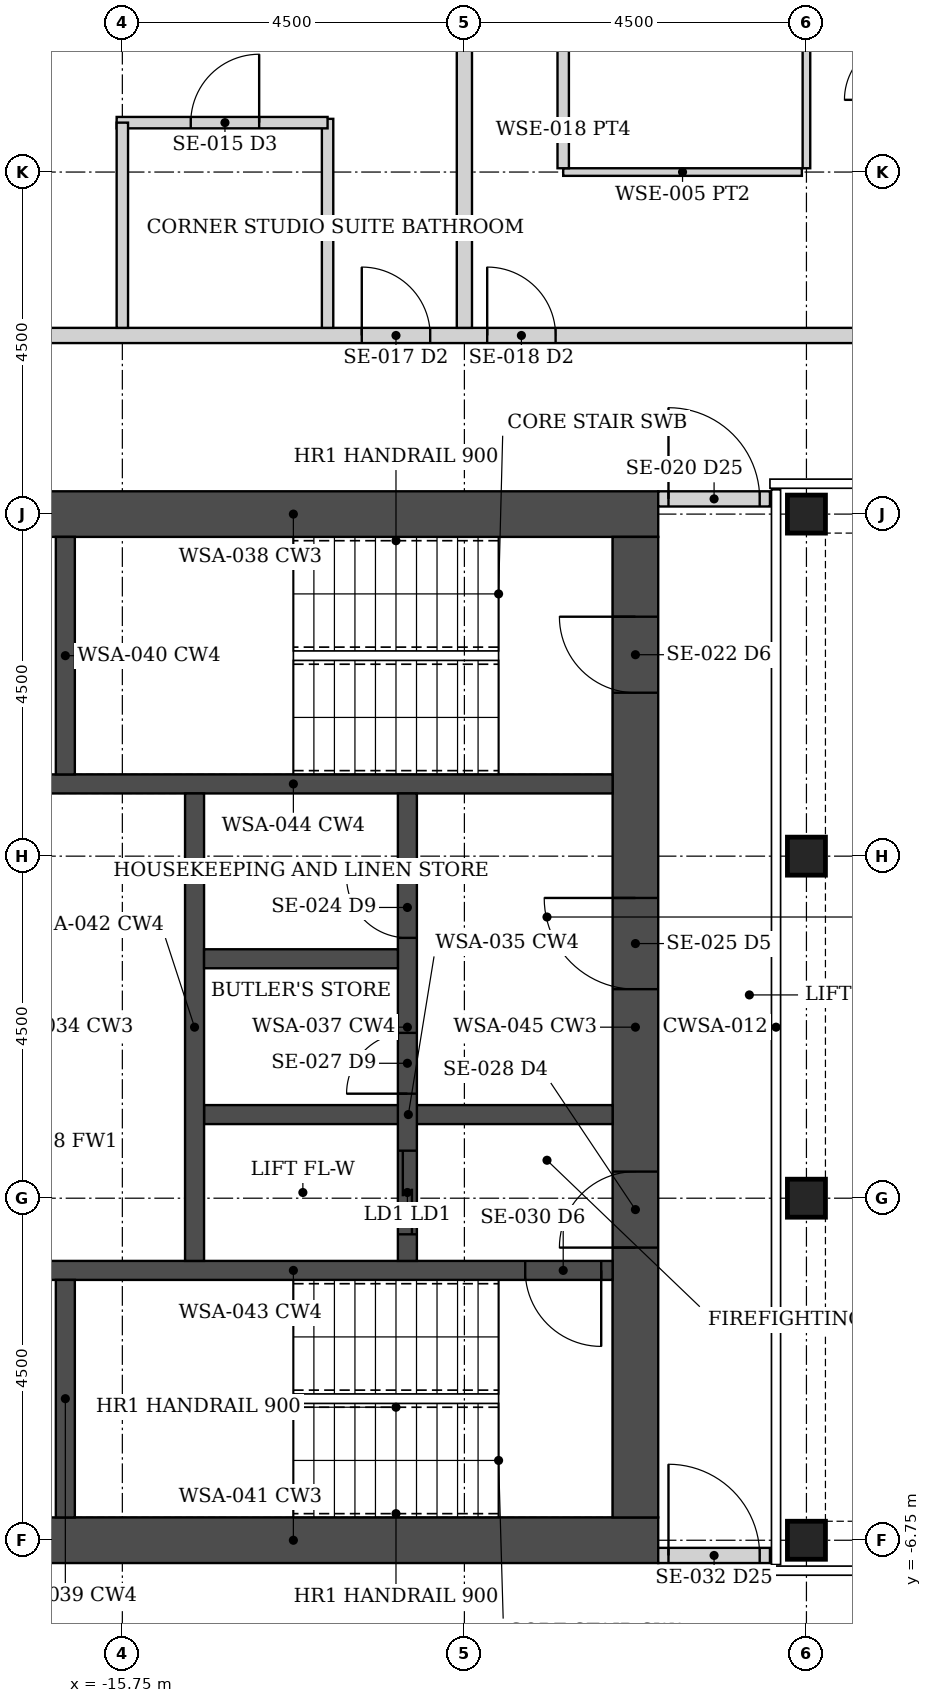
"""IFC4 building model, lengths in metres.
Left out: names, types, materials, properties, quantities, classifications, styles, units other than length and angle.
Written with IfcOpenShell. Run it as: python <this file> out.ifc"""

import sys

from ifc_helpers import new_model, si_unit, direction, frame, frame_2d, origin, origin_2d, place, context, subcontext, project, spatial, rectangle, hollow_rectangle, extrude, element, fill, save


model = new_model("IFC4")
c1 = context("Model", 3, precision=1e-05, world=origin(), true_north=direction((0.0, 1.0)))
c2 = subcontext(c1, "Body", "Model", "MODEL_VIEW")
j1 = project(units=[si_unit("LENGTHUNIT", "METRE"), si_unit("PLANEANGLEUNIT", "RADIAN")], contexts=[c1])
p1 = place(None, origin())
s1 = spatial("IfcSite", under=j1, at=p1, CompositionType="ELEMENT")
p2 = place(p1, origin())
s2 = spatial("IfcBuilding", under=s1, at=p2, CompositionType="ELEMENT")
p3 = place(p2, frame((0.0, 0.0, 245.8)))
s3 = spatial("IfcBuildingStorey", under=s2, at=p3, CompositionType="ELEMENT", Elevation=245.8)
for number, where, z_axis, x_axis in (
    (1, (-6.75, -6.75, 0.0), (0.0, 0.0, 1.0), (1.0, 0.0, 0.0)),
    (2, (-6.75, -2.25, 0.0), (0.0, 0.0, 1.0), (1.0, 0.0, 0.0)),
    (3, (-6.75, 2.25, 0.0), (0.0, 0.0, 1.0), (1.0, 0.0, 0.0)),
    (4, (-6.75, 6.75, 0.0), (0.0, 0.0, 1.0), (1.0, 0.0, 0.0)),
):
    element("IfcColumn", number, at=place(p3, frame(where, z_axis=z_axis, x_axis=x_axis)), inside=s3, PredefinedType="COLUMN", context=c2, shape_type="SweptSolid", body=[
        extrude(hollow_rectangle(XDim=0.5, YDim=0.5, WallThickness=0.025, at=origin_2d()), origin(), (0.0, 0.0, 1.0), 3.75),
    ])
for number, where, z_axis, x_axis in (
    (5, (-8.7, -6.75, 0.0), (0.0, 0.0, 1.0), (-1.0, 0.0, 0.0)),
    (6, (-8.7, 6.75, 0.0), (0.0, 0.0, 1.0), (-1.0, 0.0, 0.0)),
):
    element("IfcWall", number, at=place(p3, frame(where, z_axis=z_axis, x_axis=x_axis)), inside=s3, PredefinedType="SHEAR", context=c2, shape_type="SweptSolid", body=[
        extrude(rectangle(XDim=9.6, YDim=0.6, at=frame_2d((4.8, 0.0))), origin(), (0.0, 0.0, 1.0), 3.75),
    ])
p4 = place(p3, frame((-9.0, -6.45, 0.0), z_axis=(0.0, 0.0, 1.0), x_axis=(0.0, 1.0, 0.0)))
e7 = element("IfcWall", 7, at=p4, inside=s3, PredefinedType="SHEAR", context=c2, shape_type="SweptSolid", body=[
    extrude(rectangle(XDim=12.9, YDim=0.6, at=frame_2d((6.45, 0.0))), origin(), (0.0, 0.0, 1.0), 3.75),
])
p5 = place(p4, frame((3.55, 0.0, 0.0)))
e8 = element("IfcOpeningElement", 8, at=p5, cuts=e7, PredefinedType="OPENING", context=c2, shape_type="SweptSolid", body=[
    extrude(rectangle(XDim=1.0, YDim=2.1, at=frame_2d((0.5, 1.05))), frame((0.0, 0.31, 0.0), z_axis=(0.0, -1.0, 0.0), x_axis=(1.0, 0.0, 0.0)), (0.0, 0.0, 1.0), 0.62),
])
p6 = place(p4, frame((6.95, 0.0, 0.0)))
e9 = element("IfcOpeningElement", 9, at=p6, cuts=e7, PredefinedType="OPENING", context=c2, shape_type="SweptSolid", body=[
    extrude(rectangle(XDim=1.2, YDim=2.1, at=frame_2d((0.6, 1.05))), frame((0.0, 0.31, 0.0), z_axis=(0.0, -1.0, 0.0), x_axis=(1.0, 0.0, 0.0)), (0.0, 0.0, 1.0), 0.62),
])
p7 = place(p4, frame((10.85, 0.0, 0.0)))
e10 = element("IfcOpeningElement", 10, at=p7, cuts=e7, PredefinedType="OPENING", context=c2, shape_type="SweptSolid", body=[
    extrude(rectangle(XDim=1.0, YDim=2.1, at=frame_2d((0.5, 1.05))), frame((0.0, 0.31, 0.0), z_axis=(0.0, -1.0, 0.0), x_axis=(1.0, 0.0, 0.0)), (0.0, 0.0, 1.0), 0.62),
])
p8 = place(p3, frame((-9.3, -3.2, 0.0), z_axis=(0.0, 0.0, 1.0), x_axis=(-1.0, 0.0, 0.0)))
e11 = element("IfcWall", 11, at=p8, inside=s3, PredefinedType="SHEAR", context=c2, shape_type="SweptSolid", body=[
    extrude(rectangle(XDim=8.4, YDim=0.25, at=frame_2d((4.2, 0.0))), origin(), (0.0, 0.0, 1.0), 3.75),
])
p9 = place(p8, frame((0.15, 0.0, 0.0)))
e12 = element("IfcOpeningElement", 12, at=p9, cuts=e11, PredefinedType="OPENING", context=c2, shape_type="SweptSolid", body=[
    extrude(rectangle(XDim=1.0, YDim=2.1, at=frame_2d((0.5, 1.05))), frame((0.0, 0.135, 0.0), z_axis=(0.0, -1.0, 0.0), x_axis=(1.0, 0.0, 0.0)), (0.0, 0.0, 1.0), 0.27),
])
p10 = place(p3, frame((-9.3, 3.2, 0.0), z_axis=(0.0, 0.0, 1.0), x_axis=(-1.0, 0.0, 0.0)))
e13 = element("IfcWall", 13, at=p10, inside=s3, PredefinedType="SHEAR", context=c2, shape_type="SweptSolid", body=[
    extrude(rectangle(XDim=8.4, YDim=0.25, at=frame_2d((4.2, 0.0))), origin(), (0.0, 0.0, 1.0), 3.75),
])
for number, where, z_axis, x_axis in (
    (14, (-16.5, -6.45, 0.0), (0.0, 0.0, 1.0), (0.0, 1.0, 0.0)),
    (15, (-16.5, 3.325, 0.0), (0.0, 0.0, 1.0), (0.0, 1.0, 0.0)),
):
    element("IfcWall", number, at=place(p3, frame(where, z_axis=z_axis, x_axis=x_axis)), inside=s3, PredefinedType="SHEAR", context=c2, shape_type="SweptSolid", body=[
        extrude(rectangle(XDim=3.125, YDim=0.25, at=frame_2d((1.562, 0.0))), origin(), (0.0, 0.0, 1.0), 3.75),
    ])
p11 = place(p3, frame((-9.3, -1.15, 0.0), z_axis=(0.0, 0.0, 1.0), x_axis=(-1.0, 0.0, 0.0)))
e16 = element("IfcWall", 16, at=p11, inside=s3, PredefinedType="SHEAR", context=c2, shape_type="SweptSolid", body=[
    extrude(rectangle(XDim=5.375, YDim=0.25, at=frame_2d((2.688, 0.0))), origin(), (0.0, 0.0, 1.0), 3.75),
])
p12 = place(p3, frame((-12.0, -3.075, 0.0), z_axis=(0.0, 0.0, 1.0), x_axis=(0.0, 1.0, 0.0)))
e17 = element("IfcWall", 17, at=p12, inside=s3, PredefinedType="SHEAR", context=c2, shape_type="SweptSolid", body=[
    extrude(rectangle(XDim=6.15, YDim=0.25, at=frame_2d((3.075, 0.0))), origin(), (0.0, 0.0, 1.0), 3.75),
])
p13 = place(p12, frame((2.2, 0.0, 0.0)))
e18 = element("IfcOpeningElement", 18, at=p13, cuts=e17, PredefinedType="OPENING", context=c2, shape_type="SweptSolid", body=[
    extrude(rectangle(XDim=0.8, YDim=2.1, at=frame_2d((0.4, 1.05))), frame((0.0, 0.135, 0.0), z_axis=(0.0, -1.0, 0.0), x_axis=(1.0, 0.0, 0.0)), (0.0, 0.0, 1.0), 0.27),
])
p14 = place(p12, frame((4.25, 0.0, 0.0)))
e19 = element("IfcOpeningElement", 19, at=p14, cuts=e17, PredefinedType="OPENING", context=c2, shape_type="SweptSolid", body=[
    extrude(rectangle(XDim=0.8, YDim=2.1, at=frame_2d((0.4, 1.05))), frame((0.0, 0.135, 0.0), z_axis=(0.0, -1.0, 0.0), x_axis=(1.0, 0.0, 0.0)), (0.0, 0.0, 1.0), 0.27),
])
p15 = place(p12, frame((0.35, 0.0, 0.0)))
e20 = element("IfcOpeningElement", 20, at=p15, cuts=e17, PredefinedType="OPENING", context=c2, shape_type="SweptSolid", body=[
    extrude(rectangle(XDim=1.1, YDim=2.1, at=frame_2d((0.55, 1.05))), frame((0.0, 0.135, 0.0), z_axis=(0.0, -1.0, 0.0), x_axis=(1.0, 0.0, 0.0)), (0.0, 0.0, 1.0), 0.27),
])
p16 = place(p3, frame((-14.8, -3.075, 0.0), z_axis=(0.0, 0.0, 1.0), x_axis=(0.0, 1.0, 0.0)))
e21 = element("IfcWall", 21, at=p16, inside=s3, PredefinedType="SHEAR", context=c2, shape_type="SweptSolid", body=[
    extrude(rectangle(XDim=6.15, YDim=0.25, at=frame_2d((3.075, 0.0))), origin(), (0.0, 0.0, 1.0), 3.75),
])
p17 = place(p3, frame((-12.125, 0.9, 0.0), z_axis=(0.0, 0.0, 1.0), x_axis=(-1.0, 0.0, 0.0)))
e22 = element("IfcWall", 22, at=p17, inside=s3, PredefinedType="SHEAR", context=c2, shape_type="SweptSolid", body=[
    extrude(rectangle(XDim=2.55, YDim=0.25, at=frame_2d((1.275, 0.0))), origin(), (0.0, 0.0, 1.0), 3.75),
])
p18 = place(p3, frame((-8.7, 6.95, 0.0), z_axis=(0.0, 0.0, 1.0), x_axis=(1.0, 0.0, 0.0)))
e23 = element("IfcWall", 23, at=p18, inside=s3, PredefinedType="PARTITIONING", context=c2, shape_type="SweptSolid", body=[
    extrude(rectangle(XDim=1.47, YDim=0.2, at=frame_2d((0.735, 0.0))), origin(), (0.0, 0.0, 1.0), 2.629),
])
p19 = place(p18, frame((0.135, 0.0, 0.0)))
e24 = element("IfcOpeningElement", 24, at=p19, cuts=e23, PredefinedType="OPENING", context=c2, shape_type="SweptSolid", body=[
    extrude(rectangle(XDim=1.2, YDim=2.1, at=frame_2d((0.6, 1.05))), frame((0.0, 0.11, 0.0), z_axis=(0.0, -1.0, 0.0), x_axis=(1.0, 0.0, 0.0)), (0.0, 0.0, 1.0), 0.22),
])
p20 = place(p3, frame((-8.7, -6.95, 0.0), z_axis=(0.0, 0.0, 1.0), x_axis=(1.0, 0.0, 0.0)))
e25 = element("IfcWall", 25, at=p20, inside=s3, PredefinedType="PARTITIONING", context=c2, shape_type="SweptSolid", body=[
    extrude(rectangle(XDim=1.47, YDim=0.2, at=frame_2d((0.735, 0.0))), origin(), (0.0, 0.0, 1.0), 2.629),
])
p21 = place(p20, frame((0.135, 0.0, 0.0)))
e26 = element("IfcOpeningElement", 26, at=p21, cuts=e25, PredefinedType="OPENING", context=c2, shape_type="SweptSolid", body=[
    extrude(rectangle(XDim=1.2, YDim=2.1, at=frame_2d((0.6, 1.05))), frame((0.0, 0.11, 0.0), z_axis=(0.0, -1.0, 0.0), x_axis=(1.0, 0.0, 0.0)), (0.0, 0.0, 1.0), 0.22),
])
p22 = place(p3, frame((-20.05, 9.1, 0.0), z_axis=(0.0, 0.0, 1.0), x_axis=(1.0, 0.0, 0.0)))
e27 = element("IfcWall", 27, at=p22, inside=s3, PredefinedType="PARTITIONING", context=c2, shape_type="SweptSolid", body=[
    extrude(rectangle(XDim=40.1, YDim=0.2, at=frame_2d((20.05, 0.0))), origin(), (0.0, 0.0, 1.0), 2.629),
])
p23 = place(p22, frame((9.1, 0.0, 0.0)))
e28 = element("IfcOpeningElement", 28, at=p23, cuts=e27, PredefinedType="OPENING", context=c2, shape_type="SweptSolid", body=[
    extrude(rectangle(XDim=0.9, YDim=2.1, at=frame_2d((0.45, 1.05))), frame((0.0, 0.11, 0.0), z_axis=(0.0, -1.0, 0.0), x_axis=(1.0, 0.0, 0.0)), (0.0, 0.0, 1.0), 0.22),
])
p24 = place(p22, frame((31.75, 0.0, 0.0)))
e29 = element("IfcOpeningElement", 29, at=p24, cuts=e27, PredefinedType="OPENING", context=c2, shape_type="SweptSolid", body=[
    extrude(rectangle(XDim=0.9, YDim=2.1, at=frame_2d((0.45, 1.05))), frame((0.0, 0.11, 0.0), z_axis=(0.0, -1.0, 0.0), x_axis=(1.0, 0.0, 0.0)), (0.0, 0.0, 1.0), 0.22),
])
p25 = place(p22, frame((7.45, 0.0, 0.0)))
e30 = element("IfcOpeningElement", 30, at=p25, cuts=e27, PredefinedType="OPENING", context=c2, shape_type="SweptSolid", body=[
    extrude(rectangle(XDim=0.9, YDim=2.1, at=frame_2d((0.45, 1.05))), frame((0.0, 0.11, 0.0), z_axis=(0.0, -1.0, 0.0), x_axis=(1.0, 0.0, 0.0)), (0.0, 0.0, 1.0), 0.22),
])
p26 = place(p3, frame((-9.95, 11.25, 0.0), z_axis=(0.0, 0.0, 1.0), x_axis=(1.0, 0.0, 0.0)))
e31 = element("IfcWall", 31, at=p26, inside=s3, PredefinedType="PARTITIONING", context=c2, shape_type="SweptSolid", body=[
    extrude(rectangle(XDim=3.14, YDim=0.1, at=frame_2d((1.57, 0.0))), origin(), (0.0, 0.0, 1.0), 2.629),
])
p27 = place(p3, frame((-9.95, 11.3, 0.0), z_axis=(0.0, 0.0, 1.0), x_axis=(0.0, 1.0, 0.0)))
e32 = element("IfcWall", 32, at=p27, inside=s3, PredefinedType="PARTITIONING", context=c2, shape_type="SweptSolid", body=[
    extrude(rectangle(XDim=5.0, YDim=0.15, at=frame_2d((2.5, 0.0))), origin(), (0.0, 0.0, 1.0), 2.629),
])
p28 = place(p27, frame((2.05, 0.0, 0.0)))
e33 = element("IfcOpeningElement", 33, at=p28, cuts=e32, PredefinedType="OPENING", context=c2, shape_type="SweptSolid", body=[
    extrude(rectangle(XDim=0.9, YDim=2.1, at=frame_2d((0.45, 1.05))), frame((0.0, 0.085, 0.0), z_axis=(0.0, -1.0, 0.0), x_axis=(1.0, 0.0, 0.0)), (0.0, 0.0, 1.0), 0.17),
])
p29 = place(p3, frame((-6.75, 11.3, 0.0), z_axis=(0.0, 0.0, 1.0), x_axis=(0.0, 1.0, 0.0)))
e34 = element("IfcWall", 34, at=p29, inside=s3, PredefinedType="PARTITIONING", context=c2, shape_type="SweptSolid", body=[
    extrude(rectangle(XDim=8.6, YDim=0.1, at=frame_2d((4.3, 0.0))), origin(), (0.0, 0.0, 1.0), 2.629),
])
p30 = place(p3, frame((-11.25, 9.2, 0.0), z_axis=(0.0, 0.0, 1.0), x_axis=(0.0, 1.0, 0.0)))
e35 = element("IfcWall", 35, at=p30, inside=s3, PredefinedType="PARTITIONING", context=c2, shape_type="SweptSolid", body=[
    extrude(rectangle(XDim=10.7, YDim=0.2, at=frame_2d((5.35, 0.0))), origin(), (0.0, 0.0, 1.0), 2.629),
])
p31 = place(p3, frame((-13.05, 9.2, 0.0), z_axis=(0.0, 0.0, 1.0), x_axis=(0.0, 1.0, 0.0)))
e36 = element("IfcWall", 36, at=p31, inside=s3, PredefinedType="PARTITIONING", context=c2, shape_type="SweptSolid", body=[
    extrude(rectangle(XDim=2.75, YDim=0.15, at=frame_2d((1.375, 0.0))), origin(), (0.0, 0.0, 1.0), 2.629),
])
p32 = place(p3, frame((-15.825, 11.9, 0.0), z_axis=(0.0, 0.0, 1.0), x_axis=(1.0, 0.0, 0.0)))
e37 = element("IfcWall", 37, at=p32, inside=s3, PredefinedType="PARTITIONING", context=c2, shape_type="SweptSolid", body=[
    extrude(rectangle(XDim=2.775, YDim=0.15, at=frame_2d((1.387, 0.0))), origin(), (0.0, 0.0, 1.0), 2.629),
])
p33 = place(p32, frame((0.975, 0.0, 0.0)))
e38 = element("IfcOpeningElement", 38, at=p33, cuts=e37, PredefinedType="OPENING", context=c2, shape_type="SweptSolid", body=[
    extrude(rectangle(XDim=0.9, YDim=2.1, at=frame_2d((0.45, 1.05))), frame((0.0, 0.085, 0.0), z_axis=(0.0, -1.0, 0.0), x_axis=(1.0, 0.0, 0.0)), (0.0, 0.0, 1.0), 0.17),
])
p34 = place(p3, frame((-15.75, 9.2, 0.0), z_axis=(0.0, 0.0, 1.0), x_axis=(0.0, 1.0, 0.0)))
e39 = element("IfcWall", 39, at=p34, inside=s3, PredefinedType="PARTITIONING", context=c2, shape_type="SweptSolid", body=[
    extrude(rectangle(XDim=2.7, YDim=0.15, at=frame_2d((1.35, 0.0))), origin(), (0.0, 0.0, 1.0), 2.629),
])
p35 = place(p19, origin())
e40 = element("IfcDoor", 40, at=p35, inside=s3, OperationType="DOUBLE_DOOR_DOUBLE_SWING", PredefinedType="DOOR", context=c2, shape_type="SweptSolid", body=[
    extrude(rectangle(XDim=1.2, YDim=2.1, at=frame_2d((0.6, 1.05))), frame((0.0, 0.025, 0.0), z_axis=(0.0, -1.0, 0.0), x_axis=(1.0, 0.0, 0.0)), (0.0, 0.0, 1.0), 0.05),
])
fill(e24, e40)
p36 = place(p21, origin())
e41 = element("IfcDoor", 41, at=p36, inside=s3, OperationType="DOUBLE_DOOR_DOUBLE_SWING", PredefinedType="DOOR", context=c2, shape_type="SweptSolid", body=[
    extrude(rectangle(XDim=1.2, YDim=2.1, at=frame_2d((0.6, 1.05))), frame((0.0, 0.025, 0.0), z_axis=(0.0, -1.0, 0.0), x_axis=(1.0, 0.0, 0.0)), (0.0, 0.0, 1.0), 0.05),
])
fill(e26, e41)
p37 = place(p23, origin())
e42 = element("IfcDoor", 42, at=p37, inside=s3, OperationType="SINGLE_SWING_LEFT", PredefinedType="DOOR", context=c2, shape_type="SweptSolid", body=[
    extrude(rectangle(XDim=0.9, YDim=2.1, at=frame_2d((0.45, 1.05))), frame((0.0, 0.025, 0.0), z_axis=(0.0, -1.0, 0.0), x_axis=(1.0, 0.0, 0.0)), (0.0, 0.0, 1.0), 0.05),
])
fill(e28, e42)
p38 = place(p25, origin())
e43 = element("IfcDoor", 43, at=p38, inside=s3, OperationType="SINGLE_SWING_LEFT", PredefinedType="DOOR", context=c2, shape_type="SweptSolid", body=[
    extrude(rectangle(XDim=0.9, YDim=2.1, at=frame_2d((0.45, 1.05))), frame((0.0, 0.025, 0.0), z_axis=(0.0, -1.0, 0.0), x_axis=(1.0, 0.0, 0.0)), (0.0, 0.0, 1.0), 0.05),
])
fill(e30, e43)
p39 = place(p33, origin())
e44 = element("IfcDoor", 44, at=p39, inside=s3, OperationType="SINGLE_SWING_RIGHT", PredefinedType="DOOR", context=c2, shape_type="SweptSolid", body=[
    extrude(rectangle(XDim=0.9, YDim=2.1, at=frame_2d((0.45, 1.05))), frame((0.0, 0.025, 0.0), z_axis=(0.0, -1.0, 0.0), x_axis=(1.0, 0.0, 0.0)), (0.0, 0.0, 1.0), 0.05),
])
fill(e38, e44)
p40 = place(p5, origin())
e45 = element("IfcDoor", 45, at=p40, inside=s3, OperationType="SINGLE_SWING_LEFT", PredefinedType="DOOR", context=c2, shape_type="SweptSolid", body=[
    extrude(rectangle(XDim=1.0, YDim=2.1, at=frame_2d((0.5, 1.05))), frame((0.0, 0.025, 0.0), z_axis=(0.0, -1.0, 0.0), x_axis=(1.0, 0.0, 0.0)), (0.0, 0.0, 1.0), 0.05),
])
fill(e8, e45)
p41 = place(p9, origin())
e46 = element("IfcDoor", 46, at=p41, inside=s3, OperationType="SINGLE_SWING_LEFT", PredefinedType="DOOR", context=c2, shape_type="SweptSolid", body=[
    extrude(rectangle(XDim=1.0, YDim=2.1, at=frame_2d((0.5, 1.05))), frame((0.0, 0.025, 0.0), z_axis=(0.0, -1.0, 0.0), x_axis=(1.0, 0.0, 0.0)), (0.0, 0.0, 1.0), 0.05),
])
fill(e12, e46)
p42 = place(p6, origin())
e47 = element("IfcDoor", 47, at=p42, inside=s3, OperationType="SINGLE_SWING_RIGHT", PredefinedType="DOOR", context=c2, shape_type="SweptSolid", body=[
    extrude(rectangle(XDim=1.2, YDim=2.1, at=frame_2d((0.6, 1.05))), frame((0.0, 0.025, 0.0), z_axis=(0.0, -1.0, 0.0), x_axis=(1.0, 0.0, 0.0)), (0.0, 0.0, 1.0), 0.05),
])
fill(e9, e47)
p43 = place(p13, origin())
e48 = element("IfcDoor", 48, at=p43, inside=s3, OperationType="SINGLE_SWING_LEFT", PredefinedType="DOOR", context=c2, shape_type="SweptSolid", body=[
    extrude(rectangle(XDim=0.8, YDim=2.1, at=frame_2d((0.4, 1.05))), frame((0.0, 0.025, 0.0), z_axis=(0.0, -1.0, 0.0), x_axis=(1.0, 0.0, 0.0)), (0.0, 0.0, 1.0), 0.05),
])
fill(e18, e48)
p44 = place(p14, origin())
e49 = element("IfcDoor", 49, at=p44, inside=s3, OperationType="SINGLE_SWING_RIGHT", PredefinedType="DOOR", context=c2, shape_type="SweptSolid", body=[
    extrude(rectangle(XDim=0.8, YDim=2.1, at=frame_2d((0.4, 1.05))), frame((0.0, 0.025, 0.0), z_axis=(0.0, -1.0, 0.0), x_axis=(1.0, 0.0, 0.0)), (0.0, 0.0, 1.0), 0.05),
])
fill(e19, e49)
p45 = place(p7, origin())
e50 = element("IfcDoor", 50, at=p45, inside=s3, OperationType="SINGLE_SWING_RIGHT", PredefinedType="DOOR", context=c2, shape_type="SweptSolid", body=[
    extrude(rectangle(XDim=1.0, YDim=2.1, at=frame_2d((0.5, 1.05))), frame((0.0, 0.025, 0.0), z_axis=(0.0, -1.0, 0.0), x_axis=(1.0, 0.0, 0.0)), (0.0, 0.0, 1.0), 0.05),
])
fill(e10, e50)
p46 = place(p15, origin())
e51 = element("IfcDoor", 51, at=p46, inside=s3, OperationType="DOUBLE_DOOR_SLIDING", PredefinedType="DOOR", context=c2, shape_type="SweptSolid", body=[
    extrude(rectangle(XDim=1.1, YDim=2.1, at=frame_2d((0.55, 1.05))), frame((0.0, 0.025, 0.0), z_axis=(0.0, -1.0, 0.0), x_axis=(1.0, 0.0, 0.0)), (0.0, 0.0, 1.0), 0.05),
])
fill(e20, e51)
save(model, sys.argv[1])
